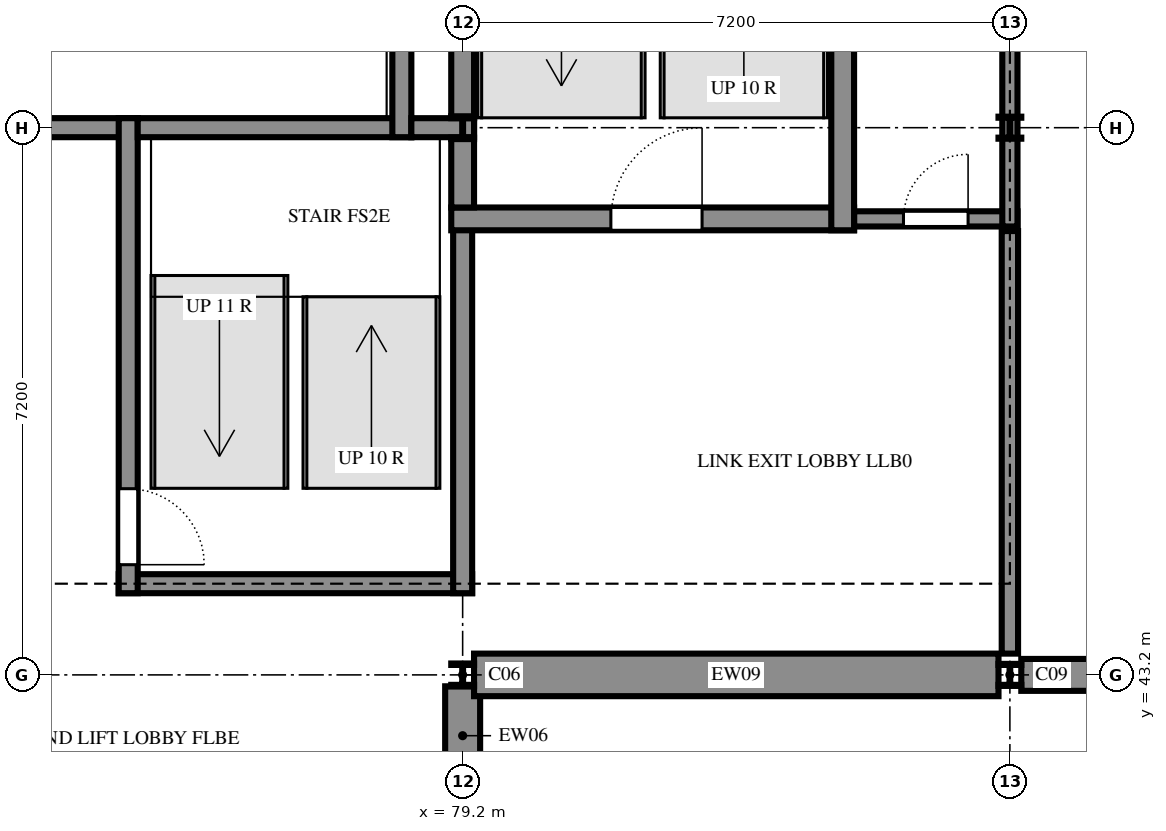
"""IFC4 building model, lengths in metres.
Left out: names, types, materials, properties, quantities, classifications, styles, units other than length and angle.
Written with IfcOpenShell. Run it as: python <this file> out.ifc"""

import sys

from ifc_helpers import new_model, si_unit, direction, frame, frame_2d, origin, origin_2d, place, context, subcontext, project, spatial, rectangle, i_section, extrude, element, fill, save


model = new_model("IFC4")
c1 = context("Model", 3, precision=1e-05, world=origin(), true_north=direction((0.0, 1.0)))
c2 = subcontext(c1, "Body", "Model", "MODEL_VIEW")
j1 = project(units=[si_unit("LENGTHUNIT", "METRE"), si_unit("PLANEANGLEUNIT", "RADIAN")], contexts=[c1])
p1 = place(None, origin())
s1 = spatial("IfcSite", under=j1, at=p1, CompositionType="ELEMENT")
p2 = place(p1, origin())
s2 = spatial("IfcBuilding", under=s1, at=p2, CompositionType="ELEMENT")
p3 = place(p2, frame((0.0, 0.0, 7.2)))
s3 = spatial("IfcBuildingStorey", under=s2, at=p3, CompositionType="ELEMENT", Elevation=7.2)
for number, where, z_axis, x_axis in (
    (1, (79.2, 43.2, 0.0), (0.0, 0.0, 1.0), (1.0, 0.0, 0.0)),
    (2, (79.2, 50.4, 0.0), (0.0, 0.0, 1.0), (1.0, 0.0, 0.0)),
):
    element("IfcColumn", number, at=place(p3, frame(where, z_axis=z_axis, x_axis=x_axis)), inside=s3, PredefinedType="COLUMN", context=c2, shape_type="SweptSolid", body=[
        extrude(i_section(OverallWidth=0.3, OverallDepth=0.3, WebThickness=0.011, FlangeThickness=0.019, FilletRadius=0.027, at=origin_2d()), origin(), (0.0, 0.0, 1.0), 3.6),
    ])
for number, where, z_axis, x_axis in (
    (3, (86.4, 43.2, 0.0), (0.0, 0.0, 1.0), (1.0, 0.0, 0.0)),
    (4, (86.4, 50.4, 0.0), (0.0, 0.0, 1.0), (1.0, 0.0, 0.0)),
):
    element("IfcColumn", number, at=place(p3, frame(where, z_axis=z_axis, x_axis=x_axis)), inside=s3, PredefinedType="COLUMN", context=c2, shape_type="SweptSolid", body=[
        extrude(i_section(OverallWidth=0.3, OverallDepth=0.29, WebThickness=0.009, FlangeThickness=0.014, FilletRadius=0.027, at=origin_2d()), origin(), (0.0, 0.0, 1.0), 3.6),
    ])
p4 = place(p3, frame((74.675, 44.4, 0.0), z_axis=(0.0, 0.0, 1.0), x_axis=(1.0, 0.0, 0.0)))
e5 = element("IfcWall", 5, at=p4, inside=s3, PredefinedType="SHEAR", context=c2, shape_type="SweptSolid", body=[
    extrude(rectangle(XDim=4.65, YDim=0.25, at=frame_2d((2.325, 0.0))), origin(), (0.0, 0.0, 1.0), 3.6),
])
p5 = place(p3, frame((79.2, 44.275, 0.0), z_axis=(0.0, 0.0, 1.0), x_axis=(0.0, 1.0, 0.0)))
e6 = element("IfcWall", 6, at=p5, inside=s3, PredefinedType="SHEAR", context=c2, shape_type="SweptSolid", body=[
    extrude(rectangle(XDim=5.075, YDim=0.25, at=frame_2d((2.538, 0.0))), origin(), (0.0, 0.0, 1.0), 3.6),
])
p6 = place(p3, frame((79.05, 49.2, 0.0), z_axis=(0.0, 0.0, 1.0), x_axis=(1.0, 0.0, 0.0)))
e7 = element("IfcWall", 7, at=p6, inside=s3, PredefinedType="SHEAR", context=c2, shape_type="SweptSolid", body=[
    extrude(rectangle(XDim=5.3, YDim=0.3, at=frame_2d((2.65, 0.0))), origin(), (0.0, 0.0, 1.0), 3.6),
])
p7 = place(p6, frame((2.1, 0.0, 0.0)))
e8 = element("IfcOpeningElement", 8, at=p7, cuts=e7, PredefinedType="OPENING", context=c2, shape_type="SweptSolid", body=[
    extrude(rectangle(XDim=1.2, YDim=2.4, at=frame_2d((0.6, 1.2))), frame((0.0, 0.16, 0.0), z_axis=(0.0, -1.0, 0.0), x_axis=(1.0, 0.0, 0.0)), (0.0, 0.0, 1.0), 0.32),
])
p8 = place(p3, frame((79.2, 49.35, 0.0), z_axis=(0.0, 0.0, 1.0), x_axis=(0.0, 1.0, 0.0)))
e9 = element("IfcWall", 9, at=p8, inside=s3, PredefinedType="SHEAR", context=c2, shape_type="SweptSolid", body=[
    extrude(rectangle(XDim=1.175, YDim=0.3, at=frame_2d((0.587, 0.0))), origin(), (0.0, 0.0, 1.0), 3.6),
])
p9 = place(p3, frame((84.35, 49.2, 0.0), z_axis=(0.0, 0.0, 1.0), x_axis=(1.0, 0.0, 0.0)))
e10 = element("IfcWall", 10, at=p9, inside=s3, PredefinedType="SHEAR", context=c2, shape_type="SweptSolid", body=[
    extrude(rectangle(XDim=2.15, YDim=0.2, at=frame_2d((1.075, 0.0))), origin(), (0.0, 0.0, 1.0), 3.6),
])
p10 = place(p9, frame((0.65, 0.0, 0.0)))
e11 = element("IfcOpeningElement", 11, at=p10, cuts=e10, PredefinedType="OPENING", context=c2, shape_type="SweptSolid", body=[
    extrude(rectangle(XDim=0.85, YDim=2.1, at=frame_2d((0.425, 1.05))), frame((0.0, 0.11, 0.0), z_axis=(0.0, -1.0, 0.0), x_axis=(1.0, 0.0, 0.0)), (0.0, 0.0, 1.0), 0.22),
])
p11 = place(p3, frame((84.2, 49.05, 0.0), z_axis=(0.0, 0.0, 1.0), x_axis=(0.0, 1.0, 0.0)))
e12 = element("IfcWall", 12, at=p11, inside=s3, PredefinedType="SHEAR", context=c2, shape_type="SweptSolid", body=[
    extrude(rectangle(XDim=6.8, YDim=0.3, at=frame_2d((3.4, 0.0))), origin(), (0.0, 0.0, 1.0), 3.6),
])
p12 = place(p3, frame((86.4, 49.1, 0.0), z_axis=(0.0, 0.0, 1.0), x_axis=(0.0, 1.0, 0.0)))
e13 = element("IfcWall", 13, at=p12, inside=s3, PredefinedType="SHEAR", context=c2, shape_type="SweptSolid", body=[
    extrude(rectangle(XDim=6.7, YDim=0.2, at=frame_2d((3.35, 0.0))), origin(), (0.0, 0.0, 1.0), 3.6),
])
p13 = place(p3, frame((73.525, 50.4, 0.0), z_axis=(0.0, 0.0, 1.0), x_axis=(1.0, 0.0, 0.0)))
e14 = element("IfcWall", 14, at=p13, inside=s3, PredefinedType="SHEAR", context=c2, shape_type="SweptSolid", body=[
    extrude(rectangle(XDim=1.4, YDim=0.25, at=frame_2d((0.7, 0.0))), origin(), (0.0, 0.0, 1.0), 3.6),
])
p14 = place(p3, frame((74.8, 50.525, 0.0), z_axis=(0.0, 0.0, 1.0), x_axis=(0.0, -1.0, 0.0)))
e15 = element("IfcWall", 15, at=p14, inside=s3, PredefinedType="SHEAR", context=c2, shape_type="SweptSolid", body=[
    extrude(rectangle(XDim=6.25, YDim=0.25, at=frame_2d((3.125, 0.0))), origin(), (0.0, 0.0, 1.0), 3.6),
])
p15 = place(p14, frame((4.875, 0.0, 0.0)))
e16 = element("IfcOpeningElement", 16, at=p15, cuts=e15, PredefinedType="OPENING", context=c2, shape_type="SweptSolid", body=[
    extrude(rectangle(XDim=1.0, YDim=2.4, at=frame_2d((0.5, 1.2))), frame((0.0, 0.135, 0.0), z_axis=(0.0, -1.0, 0.0), x_axis=(1.0, 0.0, 0.0)), (0.0, 0.0, 1.0), 0.27),
])
p16 = place(p3, frame((78.525, 50.4, 0.0), z_axis=(0.0, 0.0, 1.0), x_axis=(-1.0, 0.0, 0.0)))
e17 = element("IfcWall", 17, at=p16, inside=s3, PredefinedType="SHEAR", context=c2, shape_type="SweptSolid", body=[
    extrude(rectangle(XDim=3.6, YDim=0.25, at=frame_2d((1.8, 0.0))), origin(), (0.0, 0.0, 1.0), 3.6),
])
p17 = place(p3, frame((78.4, 50.275, 0.0), z_axis=(0.0, 0.0, 1.0), x_axis=(0.0, 1.0, 0.0)))
e18 = element("IfcWall", 18, at=p17, inside=s3, PredefinedType="SHEAR", context=c2, shape_type="SweptSolid", body=[
    extrude(rectangle(XDim=6.75, YDim=0.25, at=frame_2d((3.375, 0.0))), origin(), (0.0, 0.0, 1.0), 3.6),
])
p18 = place(p17, frame((5.575, 0.0, 0.0)))
e19 = element("IfcOpeningElement", 19, at=p18, cuts=e18, PredefinedType="OPENING", context=c2, shape_type="SweptSolid", body=[
    extrude(rectangle(XDim=0.9, YDim=2.1, at=frame_2d((0.45, 1.05))), frame((0.0, 0.135, 0.0), z_axis=(0.0, -1.0, 0.0), x_axis=(1.0, 0.0, 0.0)), (0.0, 0.0, 1.0), 0.27),
])
p19 = place(p3, frame((79.35, 50.4, 0.0), z_axis=(0.0, 0.0, 1.0), x_axis=(-1.0, 0.0, 0.0)))
e20 = element("IfcWall", 20, at=p19, inside=s3, PredefinedType="SHEAR", context=c2, shape_type="SweptSolid", body=[
    extrude(rectangle(XDim=0.825, YDim=0.25, at=frame_2d((0.413, 0.0))), origin(), (0.0, 0.0, 1.0), 3.6),
])
p20 = place(p3, frame((79.2, 55.85, 0.0), z_axis=(0.0, 0.0, 1.0), x_axis=(0.0, -1.0, 0.0)))
e21 = element("IfcWall", 21, at=p20, inside=s3, PredefinedType="SHEAR", context=c2, shape_type="SweptSolid", body=[
    extrude(rectangle(XDim=5.325, YDim=0.3, at=frame_2d((2.663, 0.0))), origin(), (0.0, 0.0, 1.0), 3.6),
])
p21 = place(p3, frame((79.2, 41.75, 0.0), z_axis=(0.0, 0.0, 1.0), x_axis=(0.0, 1.0, 0.0)))
e22 = element("IfcWall", 22, at=p21, inside=s3, PredefinedType="SOLIDWALL", context=c2, shape_type="SweptSolid", body=[
    extrude(rectangle(XDim=1.3, YDim=0.46, at=frame_2d((0.65, 0.0))), origin(), (0.0, 0.0, 1.0), 3.22),
])
p22 = place(p3, frame((86.55, 43.2, 0.0), z_axis=(0.0, 0.0, 1.0), x_axis=(1.0, 0.0, 0.0)))
e23 = element("IfcWall", 23, at=p22, inside=s3, PredefinedType="SOLIDWALL", context=c2, shape_type="SweptSolid", body=[
    extrude(rectangle(XDim=6.9, YDim=0.42, at=frame_2d((3.45, 0.0))), origin(), (0.0, 0.0, 1.0), 3.6),
])
p23 = place(p22, frame((1.65, 0.0, 1.2)))
e24 = element("IfcOpeningElement", 24, at=p23, cuts=e23, PredefinedType="OPENING", context=c2, shape_type="SweptSolid", body=[
    extrude(rectangle(XDim=3.6, YDim=1.2, at=frame_2d((1.8, 0.6))), frame((0.0, 0.22, 0.0), z_axis=(0.0, -1.0, 0.0), x_axis=(1.0, 0.0, 0.0)), (0.0, 0.0, 1.0), 0.44),
])
p24 = place(p3, frame((79.35, 43.2, 0.0), z_axis=(0.0, 0.0, 1.0), x_axis=(1.0, 0.0, 0.0)))
e25 = element("IfcWall", 25, at=p24, inside=s3, PredefinedType="SOLIDWALL", context=c2, shape_type="SweptSolid", body=[
    extrude(rectangle(XDim=6.9, YDim=0.56, at=frame_2d((3.45, 0.0))), origin(), (0.0, 0.0, 1.0), 3.12),
])
p25 = place(p3, frame((86.4, 43.48, 0.0), z_axis=(0.0, 0.0, 1.0), x_axis=(0.0, 1.0, 0.0)))
e26 = element("IfcWall", 26, at=p25, inside=s3, PredefinedType="PARTITIONING", context=c2, shape_type="SweptSolid", body=[
    extrude(rectangle(XDim=5.56, YDim=0.215, at=frame_2d((2.78, 0.0))), origin(), (0.0, 0.0, 1.0), 3.15),
])
p26 = place(p15, origin())
e27 = element("IfcDoor", 27, at=p26, inside=s3, OperationType="SINGLE_SWING_LEFT", PredefinedType="DOOR", context=c2, shape_type="SweptSolid", body=[
    extrude(rectangle(XDim=1.0, YDim=2.4, at=frame_2d((0.5, 1.2))), frame((0.0, 0.025, 0.0), z_axis=(0.0, -1.0, 0.0), x_axis=(1.0, 0.0, 0.0)), (0.0, 0.0, 1.0), 0.05),
])
fill(e16, e27)
p27 = place(p7, origin())
e28 = element("IfcDoor", 28, at=p27, inside=s3, OperationType="SINGLE_SWING_LEFT", PredefinedType="DOOR", context=c2, shape_type="SweptSolid", body=[
    extrude(rectangle(XDim=1.2, YDim=2.4, at=frame_2d((0.6, 1.2))), frame((0.0, 0.025, 0.0), z_axis=(0.0, -1.0, 0.0), x_axis=(1.0, 0.0, 0.0)), (0.0, 0.0, 1.0), 0.05),
])
fill(e8, e28)
p28 = place(p10, origin())
e29 = element("IfcDoor", 29, at=p28, inside=s3, OperationType="SINGLE_SWING_LEFT", PredefinedType="DOOR", context=c2, shape_type="SweptSolid", body=[
    extrude(rectangle(XDim=0.85, YDim=2.1, at=frame_2d((0.425, 1.05))), frame((0.0, 0.025, 0.0), z_axis=(0.0, -1.0, 0.0), x_axis=(1.0, 0.0, 0.0)), (0.0, 0.0, 1.0), 0.05),
])
fill(e11, e29)
save(model, sys.argv[1])
